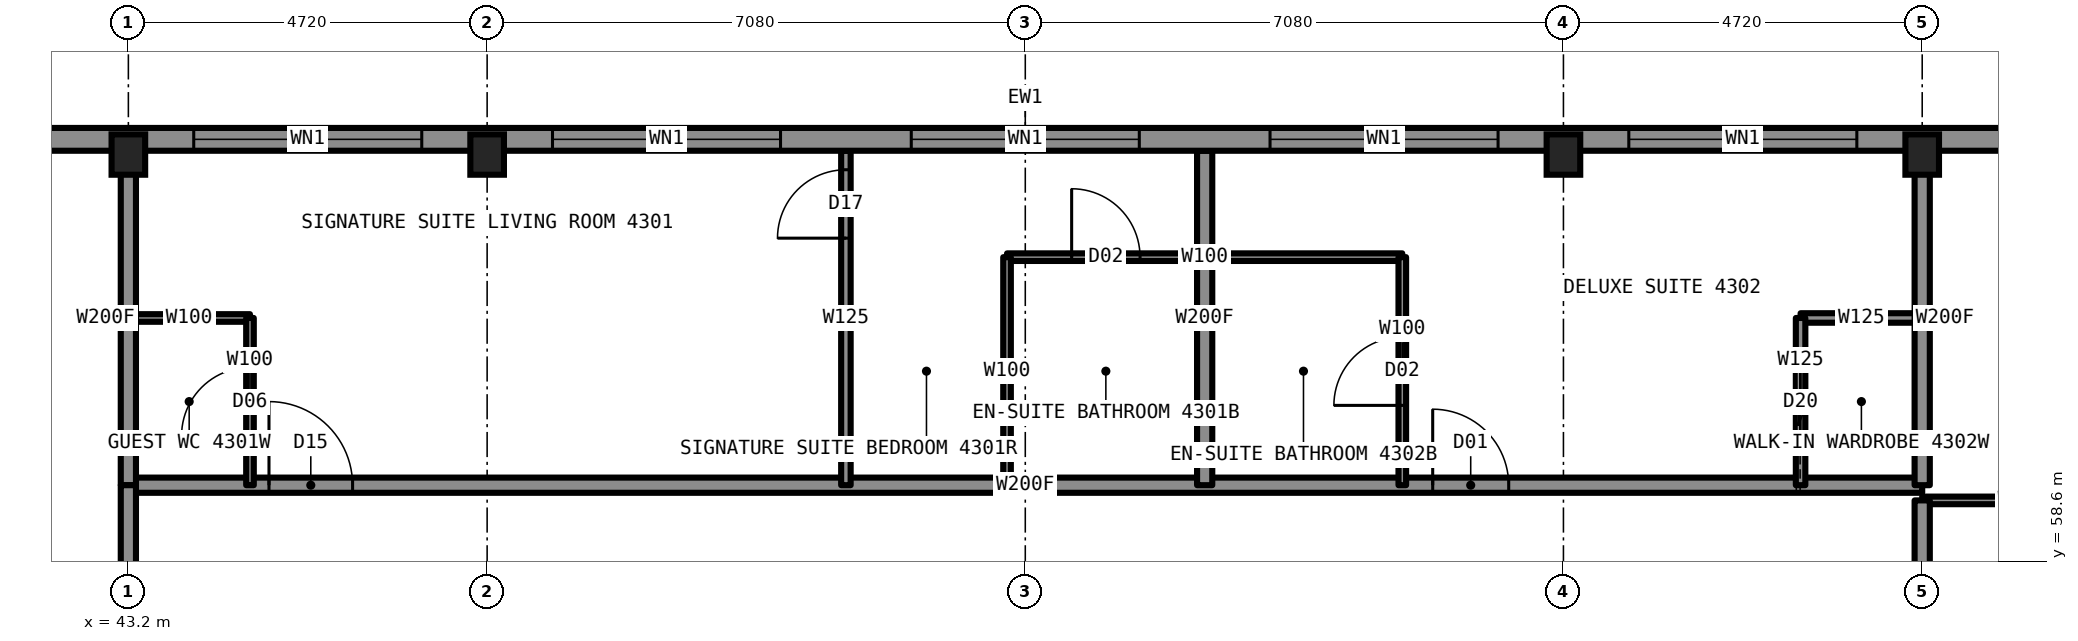
"""IFC4 building model, lengths in metres.
Left out: names, types, materials, properties, quantities, classifications, styles, units other than length and angle.
Written with IfcOpenShell. Run it as: python <this file> out.ifc"""

import sys

from ifc_helpers import new_model, si_unit, direction, frame, frame_2d, origin, origin_2d, place, context, subcontext, project, spatial, rectangle, i_section, extrude, element, fill, save


model = new_model("IFC4")
c1 = context("Model", 3, precision=1e-05, world=origin(), true_north=direction((0.0, 1.0)))
c2 = subcontext(c1, "Body", "Model", "MODEL_VIEW")
j1 = project(units=[si_unit("LENGTHUNIT", "METRE"), si_unit("PLANEANGLEUNIT", "RADIAN")], contexts=[c1])
p1 = place(None, origin())
s1 = spatial("IfcSite", under=j1, at=p1, CompositionType="ELEMENT")
p2 = place(p1, origin())
s2 = spatial("IfcBuilding", under=s1, at=p2, CompositionType="ELEMENT")
p3 = place(p2, frame((0.0, 0.0, 161.8)))
s3 = spatial("IfcBuildingStorey", under=s2, at=p3, CompositionType="ELEMENT", Elevation=161.8)
for number, where, z_axis, x_axis in (
    (1, (43.2, 63.95, 0.0), (0.0, 0.0, 1.0), (1.0, 0.0, 0.0)),
    (2, (47.92, 63.95, 0.0), (0.0, 0.0, 1.0), (1.0, 0.0, 0.0)),
    (3, (62.08, 63.95, 0.0), (0.0, 0.0, 1.0), (1.0, 0.0, 0.0)),
    (4, (66.8, 63.95, 0.0), (0.0, 0.0, 1.0), (1.0, 0.0, 0.0)),
):
    element("IfcColumn", number, at=place(p3, frame(where, z_axis=z_axis, x_axis=x_axis)), inside=s3, PredefinedType="COLUMN", context=c2, shape_type="SweptSolid", body=[
        extrude(i_section(OverallWidth=0.442, OverallDepth=0.531, WebThickness=0.066, FlangeThickness=0.106, at=origin_2d()), origin(), (0.0, 0.0, 1.0), 3.5),
    ])
p4 = place(p3, frame((66.8, 59.4, 0.0), z_axis=(0.0, 0.0, 1.0), x_axis=(1.0, 0.0, 0.0)))
e5 = element("IfcWall", 5, at=p4, inside=s3, PredefinedType="PARTITIONING", context=c2, shape_type="SweptSolid", body=[
    extrude(rectangle(XDim=2.6, YDim=0.1, at=frame_2d((1.3, 0.0))), origin(), (0.0, 0.0, 1.0), 3.33),
])
p5 = place(p3, frame((43.2, 59.6, 0.0), z_axis=(0.0, 0.0, 1.0), x_axis=(1.0, 0.0, 0.0)))
e6 = element("IfcWall", 6, at=p5, inside=s3, PredefinedType="PARTITIONING", context=c2, shape_type="SweptSolid", body=[
    extrude(rectangle(XDim=23.6, YDim=0.2, at=frame_2d((11.8, 0.0))), origin(), (0.0, 0.0, 1.0), 3.33),
])
p6 = place(p5, frame((1.85, 0.0, 0.0)))
e7 = element("IfcOpeningElement", 7, at=p6, cuts=e6, PredefinedType="OPENING", context=c2, shape_type="SweptSolid", body=[
    extrude(rectangle(XDim=1.1, YDim=2.2, at=frame_2d((0.55, 1.1))), frame((0.0, 0.11, 0.0), z_axis=(0.0, -1.0, 0.0), x_axis=(1.0, 0.0, 0.0)), (0.0, 0.0, 1.0), 0.22),
])
p7 = place(p5, frame((17.16, 0.0, 0.0)))
e8 = element("IfcOpeningElement", 8, at=p7, cuts=e6, PredefinedType="OPENING", context=c2, shape_type="SweptSolid", body=[
    extrude(rectangle(XDim=1.0, YDim=2.2, at=frame_2d((0.5, 1.1))), frame((0.0, 0.11, 0.0), z_axis=(0.0, -1.0, 0.0), x_axis=(1.0, 0.0, 0.0)), (0.0, 0.0, 1.0), 0.22),
])
p8 = place(p3, frame((43.2, 61.8, 0.0), z_axis=(0.0, 0.0, 1.0), x_axis=(1.0, 0.0, 0.0)))
e9 = element("IfcWall", 9, at=p8, inside=s3, PredefinedType="PARTITIONING", context=c2, shape_type="SweptSolid", body=[
    extrude(rectangle(XDim=1.6, YDim=0.1, at=frame_2d((0.8, 0.0))), origin(), (0.0, 0.0, 1.0), 3.33),
])
p9 = place(p3, frame((65.2, 61.8, 0.0), z_axis=(0.0, 0.0, 1.0), x_axis=(1.0, 0.0, 0.0)))
e10 = element("IfcWall", 10, at=p9, inside=s3, PredefinedType="PARTITIONING", context=c2, shape_type="SweptSolid", body=[
    extrude(rectangle(XDim=1.6, YDim=0.125, at=frame_2d((0.8, 0.0))), origin(), (0.0, 0.0, 1.0), 3.33),
])
p10 = place(p3, frame((54.76, 62.6, 0.0), z_axis=(0.0, 0.0, 1.0), x_axis=(1.0, 0.0, 0.0)))
e11 = element("IfcWall", 11, at=p10, inside=s3, PredefinedType="PARTITIONING", context=c2, shape_type="SweptSolid", body=[
    extrude(rectangle(XDim=5.2, YDim=0.1, at=frame_2d((2.6, 0.0))), origin(), (0.0, 0.0, 1.0), 3.33),
])
p11 = place(p10, frame((0.85, 0.0, 0.0)))
e12 = element("IfcOpeningElement", 12, at=p11, cuts=e11, PredefinedType="OPENING", context=c2, shape_type="SweptSolid", body=[
    extrude(rectangle(XDim=0.9, YDim=2.1, at=frame_2d((0.45, 1.05))), frame((0.0, 0.06, 0.0), z_axis=(0.0, -1.0, 0.0), x_axis=(1.0, 0.0, 0.0)), (0.0, 0.0, 1.0), 0.12),
])
p12 = place(p3, frame((54.76, 59.6, 0.0), z_axis=(0.0, 0.0, 1.0), x_axis=(0.0, 1.0, 0.0)))
e13 = element("IfcWall", 13, at=p12, inside=s3, PredefinedType="PARTITIONING", context=c2, shape_type="SweptSolid", body=[
    extrude(rectangle(XDim=3.0, YDim=0.1, at=frame_2d((1.5, 0.0))), origin(), (0.0, 0.0, 1.0), 3.33),
])
p13 = place(p3, frame((44.8, 59.6, 0.0), z_axis=(0.0, 0.0, 1.0), x_axis=(0.0, 1.0, 0.0)))
e14 = element("IfcWall", 14, at=p13, inside=s3, PredefinedType="PARTITIONING", context=c2, shape_type="SweptSolid", body=[
    extrude(rectangle(XDim=2.2, YDim=0.1, at=frame_2d((1.1, 0.0))), origin(), (0.0, 0.0, 1.0), 3.33),
])
p14 = place(p13, frame((0.65, 0.0, 0.0)))
e15 = element("IfcOpeningElement", 15, at=p14, cuts=e14, PredefinedType="OPENING", context=c2, shape_type="SweptSolid", body=[
    extrude(rectangle(XDim=0.9, YDim=2.1, at=frame_2d((0.45, 1.05))), frame((0.0, 0.06, 0.0), z_axis=(0.0, -1.0, 0.0), x_axis=(1.0, 0.0, 0.0)), (0.0, 0.0, 1.0), 0.12),
])
p15 = place(p3, frame((43.2, 59.6, 0.0), z_axis=(0.0, 0.0, 1.0), x_axis=(0.0, 1.0, 0.0)))
e16 = element("IfcWall", 16, at=p15, inside=s3, PredefinedType="PARTITIONING", context=c2, shape_type="SweptSolid", body=[
    extrude(rectangle(XDim=4.4, YDim=0.2, at=frame_2d((2.2, 0.0))), origin(), (0.0, 0.0, 1.0), 2.573),
])
p16 = place(p3, frame((52.64, 59.6, 0.0), z_axis=(0.0, 0.0, 1.0), x_axis=(0.0, 1.0, 0.0)))
e17 = element("IfcWall", 17, at=p16, inside=s3, PredefinedType="PARTITIONING", context=c2, shape_type="SweptSolid", body=[
    extrude(rectangle(XDim=4.4, YDim=0.125, at=frame_2d((2.2, 0.0))), origin(), (0.0, 0.0, 1.0), 3.33),
])
p17 = place(p16, frame((3.25, 0.0, 0.0)))
e18 = element("IfcOpeningElement", 18, at=p17, cuts=e17, PredefinedType="OPENING", context=c2, shape_type="SweptSolid", body=[
    extrude(rectangle(XDim=0.9, YDim=2.2, at=frame_2d((0.45, 1.1))), frame((0.0, 0.073, 0.0), z_axis=(0.0, -1.0, 0.0), x_axis=(1.0, 0.0, 0.0)), (0.0, 0.0, 1.0), 0.145),
])
p18 = place(p3, frame((65.2, 59.6, 0.0), z_axis=(0.0, 0.0, 1.0), x_axis=(0.0, 1.0, 0.0)))
e19 = element("IfcWall", 19, at=p18, inside=s3, PredefinedType="PARTITIONING", context=c2, shape_type="SweptSolid", body=[
    extrude(rectangle(XDim=2.2, YDim=0.125, at=frame_2d((1.1, 0.0))), origin(), (0.0, 0.0, 1.0), 3.33),
])
p19 = place(p18, frame((0.7, 0.0, 0.0)))
e20 = element("IfcOpeningElement", 20, at=p19, cuts=e19, PredefinedType="OPENING", context=c2, shape_type="SweptSolid", body=[
    extrude(rectangle(XDim=0.8, YDim=2.1, at=frame_2d((0.4, 1.05))), frame((0.0, 0.073, 0.0), z_axis=(0.0, -1.0, 0.0), x_axis=(1.0, 0.0, 0.0)), (0.0, 0.0, 1.0), 0.145),
])
p20 = place(p3, frame((66.8, 59.6, 0.0), z_axis=(0.0, 0.0, 1.0), x_axis=(0.0, 1.0, 0.0)))
e21 = element("IfcWall", 21, at=p20, inside=s3, PredefinedType="PARTITIONING", context=c2, shape_type="SweptSolid", body=[
    extrude(rectangle(XDim=4.4, YDim=0.2, at=frame_2d((2.2, 0.0))), origin(), (0.0, 0.0, 1.0), 2.573),
])
p21 = place(p3, frame((57.36, 59.6, 0.0), z_axis=(0.0, 0.0, 1.0), x_axis=(0.0, 1.0, 0.0)))
e22 = element("IfcWall", 22, at=p21, inside=s3, PredefinedType="PARTITIONING", context=c2, shape_type="SweptSolid", body=[
    extrude(rectangle(XDim=4.4, YDim=0.2, at=frame_2d((2.2, 0.0))), origin(), (0.0, 0.0, 1.0), 3.33),
])
p22 = place(p3, frame((59.96, 59.6, 0.0), z_axis=(0.0, 0.0, 1.0), x_axis=(0.0, 1.0, 0.0)))
e23 = element("IfcWall", 23, at=p22, inside=s3, PredefinedType="PARTITIONING", context=c2, shape_type="SweptSolid", body=[
    extrude(rectangle(XDim=3.0, YDim=0.1, at=frame_2d((1.5, 0.0))), origin(), (0.0, 0.0, 1.0), 3.33),
])
p23 = place(p22, frame((1.05, 0.0, 0.0)))
e24 = element("IfcOpeningElement", 24, at=p23, cuts=e23, PredefinedType="OPENING", context=c2, shape_type="SweptSolid", body=[
    extrude(rectangle(XDim=0.9, YDim=2.1, at=frame_2d((0.45, 1.05))), frame((0.0, 0.06, 0.0), z_axis=(0.0, -1.0, 0.0), x_axis=(1.0, 0.0, 0.0)), (0.0, 0.0, 1.0), 0.12),
])
p24 = place(p3, frame((68.8, 64.15, 0.0), z_axis=(0.0, 0.0, 1.0), x_axis=(-1.0, 0.0, 0.0)))
e25 = element("IfcWall", 25, at=p24, inside=s3, PredefinedType="SOLIDWALL", context=c2, shape_type="SweptSolid", body=[
    extrude(rectangle(XDim=27.6, YDim=0.3, at=frame_2d((13.8, 0.0))), origin(), (0.0, 0.0, 1.0), 2.83),
])
p25 = place(p24, frame((2.86, 0.0, 0.3)))
e26 = element("IfcOpeningElement", 26, at=p25, cuts=e25, PredefinedType="OPENING", context=c2, shape_type="SweptSolid", body=[
    extrude(rectangle(XDim=3.0, YDim=2.0, at=frame_2d((1.5, 1.0))), frame((0.0, 0.16, 0.0), z_axis=(0.0, -1.0, 0.0), x_axis=(1.0, 0.0, 0.0)), (0.0, 0.0, 1.0), 0.32),
])
p26 = place(p24, frame((7.58, 0.0, 0.3)))
e27 = element("IfcOpeningElement", 27, at=p26, cuts=e25, PredefinedType="OPENING", context=c2, shape_type="SweptSolid", body=[
    extrude(rectangle(XDim=3.0, YDim=2.0, at=frame_2d((1.5, 1.0))), frame((0.0, 0.16, 0.0), z_axis=(0.0, -1.0, 0.0), x_axis=(1.0, 0.0, 0.0)), (0.0, 0.0, 1.0), 0.32),
])
p27 = place(p24, frame((12.3, 0.0, 0.3)))
e28 = element("IfcOpeningElement", 28, at=p27, cuts=e25, PredefinedType="OPENING", context=c2, shape_type="SweptSolid", body=[
    extrude(rectangle(XDim=3.0, YDim=2.0, at=frame_2d((1.5, 1.0))), frame((0.0, 0.16, 0.0), z_axis=(0.0, -1.0, 0.0), x_axis=(1.0, 0.0, 0.0)), (0.0, 0.0, 1.0), 0.32),
])
p28 = place(p24, frame((17.02, 0.0, 0.3)))
e29 = element("IfcOpeningElement", 29, at=p28, cuts=e25, PredefinedType="OPENING", context=c2, shape_type="SweptSolid", body=[
    extrude(rectangle(XDim=3.0, YDim=2.0, at=frame_2d((1.5, 1.0))), frame((0.0, 0.16, 0.0), z_axis=(0.0, -1.0, 0.0), x_axis=(1.0, 0.0, 0.0)), (0.0, 0.0, 1.0), 0.32),
])
p29 = place(p24, frame((21.74, 0.0, 0.3)))
e30 = element("IfcOpeningElement", 30, at=p29, cuts=e25, PredefinedType="OPENING", context=c2, shape_type="SweptSolid", body=[
    extrude(rectangle(XDim=3.0, YDim=2.0, at=frame_2d((1.5, 1.0))), frame((0.0, 0.16, 0.0), z_axis=(0.0, -1.0, 0.0), x_axis=(1.0, 0.0, 0.0)), (0.0, 0.0, 1.0), 0.32),
])
p30 = place(p3, frame((43.2, 56.78, 0.0), z_axis=(0.0, 0.0, 1.0), x_axis=(0.0, 1.0, 0.0)))
e31 = element("IfcWall", 31, at=p30, inside=s3, PredefinedType="PARTITIONING", context=c2, shape_type="SweptSolid", body=[
    extrude(rectangle(XDim=2.82, YDim=0.2, at=frame_2d((1.41, 0.0))), origin(), (0.0, 0.0, 1.0), 2.573),
])
p31 = place(p3, frame((66.8, 56.78, 0.0), z_axis=(0.0, 0.0, 1.0), x_axis=(0.0, 1.0, 0.0)))
e32 = element("IfcWall", 32, at=p31, inside=s3, PredefinedType="PARTITIONING", context=c2, shape_type="SweptSolid", body=[
    extrude(rectangle(XDim=2.62, YDim=0.2, at=frame_2d((1.31, 0.0))), origin(), (0.0, 0.0, 1.0), 2.573),
])
p32 = place(p6, origin())
e33 = element("IfcDoor", 33, at=p32, inside=s3, OperationType="SINGLE_SWING_LEFT", PredefinedType="DOOR", context=c2, shape_type="SweptSolid", body=[
    extrude(rectangle(XDim=1.1, YDim=2.2, at=frame_2d((0.55, 1.1))), frame((0.0, 0.025, 0.0), z_axis=(0.0, -1.0, 0.0), x_axis=(1.0, 0.0, 0.0)), (0.0, 0.0, 1.0), 0.05),
])
fill(e7, e33)
p33 = place(p11, origin())
e34 = element("IfcDoor", 34, at=p33, inside=s3, OperationType="SINGLE_SWING_RIGHT", PredefinedType="DOOR", context=c2, shape_type="SweptSolid", body=[
    extrude(rectangle(XDim=0.9, YDim=2.1, at=frame_2d((0.45, 1.05))), frame((0.0, 0.025, 0.0), z_axis=(0.0, -1.0, 0.0), x_axis=(1.0, 0.0, 0.0)), (0.0, 0.0, 1.0), 0.05),
])
fill(e12, e34)
p34 = place(p17, origin())
e35 = element("IfcDoor", 35, at=p34, inside=s3, OperationType="SINGLE_SWING_LEFT", PredefinedType="DOOR", context=c2, shape_type="SweptSolid", body=[
    extrude(rectangle(XDim=0.9, YDim=2.2, at=frame_2d((0.45, 1.1))), frame((0.0, 0.025, 0.0), z_axis=(0.0, -1.0, 0.0), x_axis=(1.0, 0.0, 0.0)), (0.0, 0.0, 1.0), 0.05),
])
fill(e18, e35)
p35 = place(p14, origin())
e36 = element("IfcDoor", 36, at=p35, inside=s3, OperationType="SINGLE_SWING_LEFT", PredefinedType="DOOR", context=c2, shape_type="SweptSolid", body=[
    extrude(rectangle(XDim=0.9, YDim=2.1, at=frame_2d((0.45, 1.05))), frame((0.0, 0.025, 0.0), z_axis=(0.0, -1.0, 0.0), x_axis=(1.0, 0.0, 0.0)), (0.0, 0.0, 1.0), 0.05),
])
fill(e15, e36)
p36 = place(p7, origin())
e37 = element("IfcDoor", 37, at=p36, inside=s3, OperationType="SINGLE_SWING_LEFT", PredefinedType="DOOR", context=c2, shape_type="SweptSolid", body=[
    extrude(rectangle(XDim=1.0, YDim=2.2, at=frame_2d((0.5, 1.1))), frame((0.0, 0.025, 0.0), z_axis=(0.0, -1.0, 0.0), x_axis=(1.0, 0.0, 0.0)), (0.0, 0.0, 1.0), 0.05),
])
fill(e8, e37)
p37 = place(p23, origin())
e38 = element("IfcDoor", 38, at=p37, inside=s3, OperationType="SINGLE_SWING_RIGHT", PredefinedType="DOOR", context=c2, shape_type="SweptSolid", body=[
    extrude(rectangle(XDim=0.9, YDim=2.1, at=frame_2d((0.45, 1.05))), frame((0.0, 0.025, 0.0), z_axis=(0.0, -1.0, 0.0), x_axis=(1.0, 0.0, 0.0)), (0.0, 0.0, 1.0), 0.05),
])
fill(e24, e38)
p38 = place(p19, origin())
e39 = element("IfcDoor", 39, at=p38, inside=s3, OperationType="SLIDING_TO_LEFT", PredefinedType="DOOR", context=c2, shape_type="SweptSolid", body=[
    extrude(rectangle(XDim=0.8, YDim=2.1, at=frame_2d((0.4, 1.05))), frame((0.0, 0.025, 0.0), z_axis=(0.0, -1.0, 0.0), x_axis=(1.0, 0.0, 0.0)), (0.0, 0.0, 1.0), 0.05),
])
fill(e20, e39)
p39 = place(p25, origin())
e40 = element("IfcWindow", 40, at=p39, inside=s3, PartitioningType="SINGLE_PANEL", PredefinedType="WINDOW", context=c2, shape_type="SweptSolid", body=[
    extrude(rectangle(XDim=3.0, YDim=2.0, at=frame_2d((1.5, 1.0))), frame((0.0, 0.13, 0.0), z_axis=(0.0, -1.0, 0.0), x_axis=(1.0, 0.0, 0.0)), (0.0, 0.0, 1.0), 0.06),
])
fill(e26, e40)
p40 = place(p26, origin())
e41 = element("IfcWindow", 41, at=p40, inside=s3, PartitioningType="SINGLE_PANEL", PredefinedType="WINDOW", context=c2, shape_type="SweptSolid", body=[
    extrude(rectangle(XDim=3.0, YDim=2.0, at=frame_2d((1.5, 1.0))), frame((0.0, 0.13, 0.0), z_axis=(0.0, -1.0, 0.0), x_axis=(1.0, 0.0, 0.0)), (0.0, 0.0, 1.0), 0.06),
])
fill(e27, e41)
p41 = place(p27, origin())
e42 = element("IfcWindow", 42, at=p41, inside=s3, PartitioningType="SINGLE_PANEL", PredefinedType="WINDOW", context=c2, shape_type="SweptSolid", body=[
    extrude(rectangle(XDim=3.0, YDim=2.0, at=frame_2d((1.5, 1.0))), frame((0.0, 0.13, 0.0), z_axis=(0.0, -1.0, 0.0), x_axis=(1.0, 0.0, 0.0)), (0.0, 0.0, 1.0), 0.06),
])
fill(e28, e42)
p42 = place(p28, origin())
e43 = element("IfcWindow", 43, at=p42, inside=s3, PartitioningType="SINGLE_PANEL", PredefinedType="WINDOW", context=c2, shape_type="SweptSolid", body=[
    extrude(rectangle(XDim=3.0, YDim=2.0, at=frame_2d((1.5, 1.0))), frame((0.0, 0.13, 0.0), z_axis=(0.0, -1.0, 0.0), x_axis=(1.0, 0.0, 0.0)), (0.0, 0.0, 1.0), 0.06),
])
fill(e29, e43)
p43 = place(p29, origin())
e44 = element("IfcWindow", 44, at=p43, inside=s3, PartitioningType="SINGLE_PANEL", PredefinedType="WINDOW", context=c2, shape_type="SweptSolid", body=[
    extrude(rectangle(XDim=3.0, YDim=2.0, at=frame_2d((1.5, 1.0))), frame((0.0, 0.13, 0.0), z_axis=(0.0, -1.0, 0.0), x_axis=(1.0, 0.0, 0.0)), (0.0, 0.0, 1.0), 0.06),
])
fill(e30, e44)
save(model, sys.argv[1])
